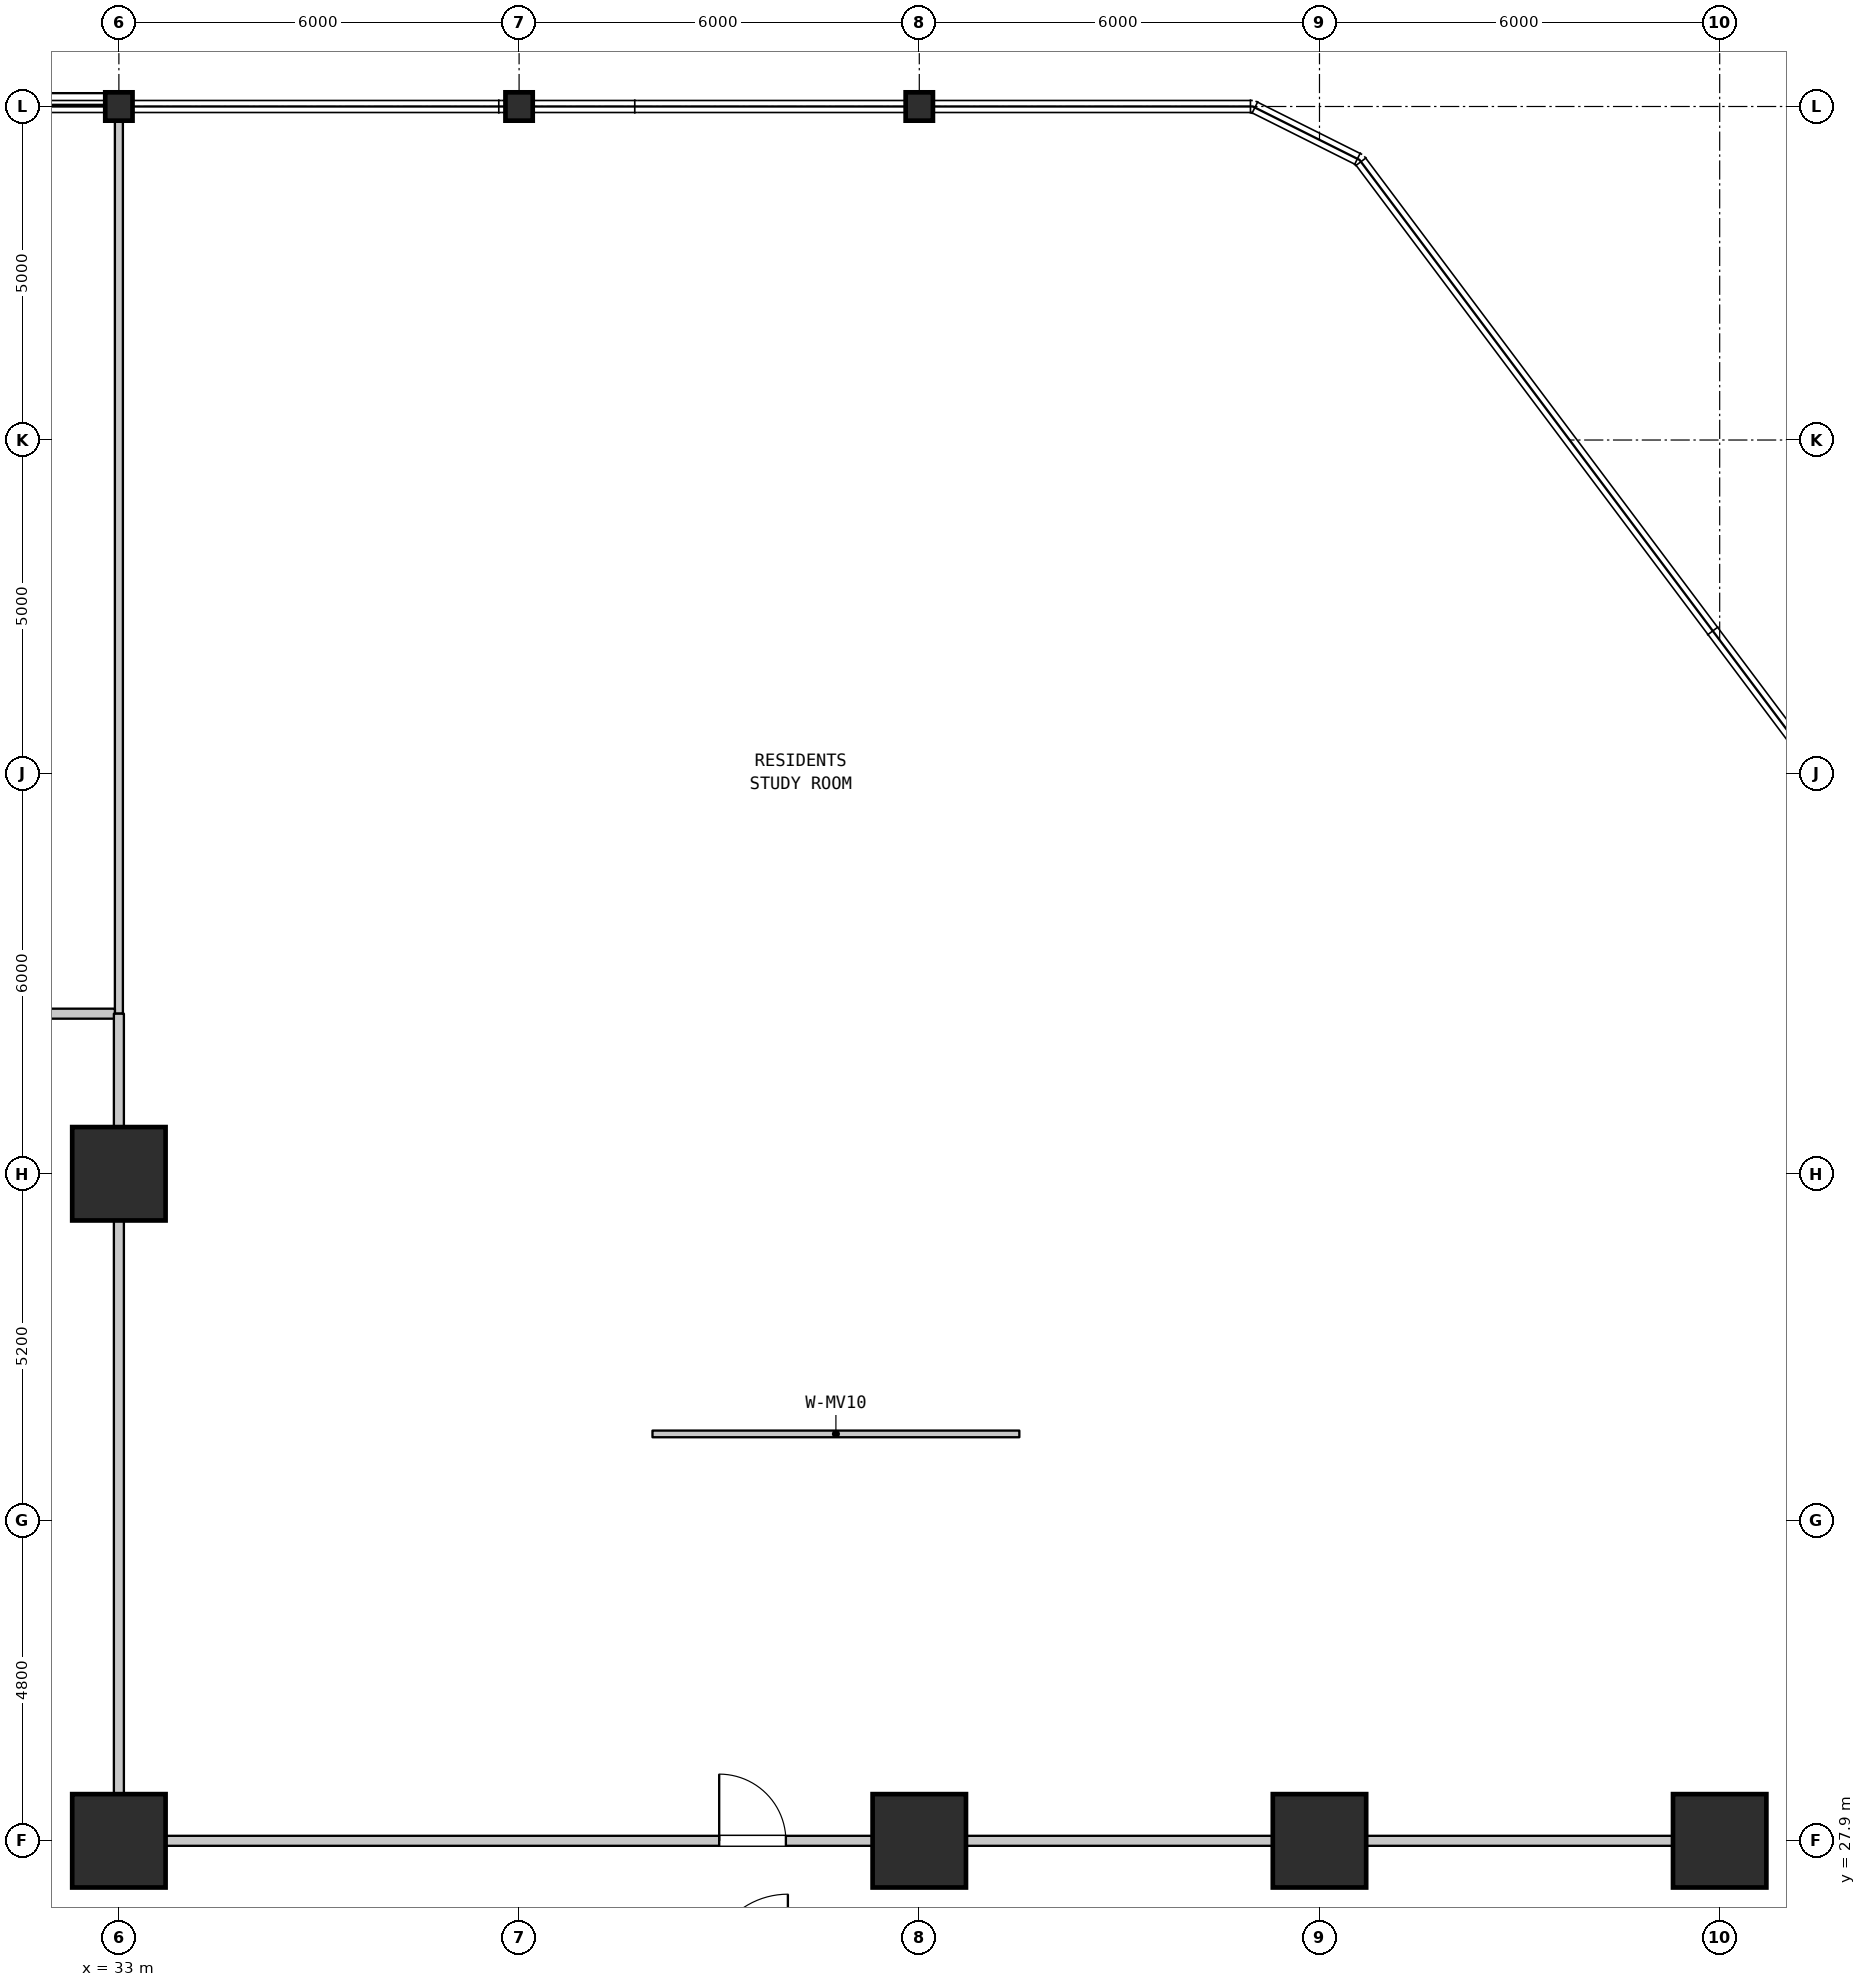
"""IFC4 building model, lengths in metres.
Left out: names, types, materials, properties, quantities, classifications, styles, units other than length and angle.
Written with IfcOpenShell. Run it as: python <this file> out.ifc"""

import sys

from ifc_helpers import new_model, si_unit, direction, frame, frame_2d, origin, origin_2d, place, context, subcontext, project, spatial, rectangle, i_section, extrude, element, fill, save


model = new_model("IFC4")
c1 = context("Model", 3, precision=1e-05, world=origin(), true_north=direction((0.0, 1.0)))
c2 = subcontext(c1, "Body", "Model", "MODEL_VIEW")
j1 = project(units=[si_unit("LENGTHUNIT", "METRE"), si_unit("PLANEANGLEUNIT", "RADIAN")], contexts=[c1])
p1 = place(None, origin())
s1 = spatial("IfcSite", under=j1, at=p1, CompositionType="ELEMENT")
p2 = place(p1, origin())
s2 = spatial("IfcBuilding", under=s1, at=p2, CompositionType="ELEMENT")
p3 = place(p2, frame((0.0, 0.0, 19.0)))
s3 = spatial("IfcBuildingStorey", under=s2, at=p3, CompositionType="ELEMENT", Elevation=19.0)
for number, where, z_axis, x_axis in (
    (1, (33.0, 27.9, 0.0), (0.0, 0.0, 1.0), (1.0, 0.0, 0.0)),
    (2, (33.0, 37.9, 0.0), (0.0, 0.0, 1.0), (1.0, 0.0, 0.0)),
):
    element("IfcColumn", number, at=place(p3, frame(where, z_axis=z_axis, x_axis=x_axis)), inside=s3, PredefinedType="COLUMN", context=c2, shape_type="SweptSolid", body=[
        extrude(rectangle(XDim=1.4, YDim=1.4, at=origin_2d()), origin(), (0.0, 0.0, 1.0), 5.0),
    ])
for number, where, z_axis, x_axis in (
    (3, (33.0, 53.9, 0.0), (0.0, 0.0, 1.0), (1.0, 0.0, 0.0)),
    (4, (39.0, 53.9, 0.0), (0.0, 0.0, 1.0), (1.0, 0.0, 0.0)),
):
    element("IfcColumn", number, at=place(p3, frame(where, z_axis=z_axis, x_axis=x_axis)), inside=s3, PredefinedType="COLUMN", context=c2, shape_type="SweptSolid", body=[
        extrude(i_section(OverallWidth=0.409, OverallDepth=0.425, WebThickness=0.032, FlangeThickness=0.052, FilletRadius=0.015, at=origin_2d()), origin(), (0.0, 0.0, 1.0), 5.0),
    ])
p4 = place(p3, frame((45.0, 27.9, 0.0), z_axis=(0.0, 0.0, 1.0), x_axis=(1.0, 0.0, 0.0)))
e5 = element("IfcColumn", 5, at=p4, inside=s3, PredefinedType="COLUMN", context=c2, shape_type="SweptSolid", body=[
    extrude(rectangle(XDim=1.4, YDim=1.4, at=origin_2d()), origin(), (0.0, 0.0, 1.0), 5.0),
])
p5 = place(p3, frame((45.0, 53.9, 0.0), z_axis=(0.0, 0.0, 1.0), x_axis=(1.0, 0.0, 0.0)))
e6 = element("IfcColumn", 6, at=p5, inside=s3, PredefinedType="COLUMN", context=c2, shape_type="SweptSolid", body=[
    extrude(i_section(OverallWidth=0.409, OverallDepth=0.425, WebThickness=0.032, FlangeThickness=0.052, FilletRadius=0.015, at=origin_2d()), origin(), (0.0, 0.0, 1.0), 5.0),
])
for number, where, z_axis, x_axis in (
    (7, (51.0, 27.9, 0.0), (0.0, 0.0, 1.0), (1.0, 0.0, 0.0)),
    (8, (57.0, 27.9, 0.0), (0.0, 0.0, 1.0), (1.0, 0.0, 0.0)),
):
    element("IfcColumn", number, at=place(p3, frame(where, z_axis=z_axis, x_axis=x_axis)), inside=s3, PredefinedType="COLUMN", context=c2, shape_type="SweptSolid", body=[
        extrude(rectangle(XDim=1.4, YDim=1.4, at=origin_2d()), origin(), (0.0, 0.0, 1.0), 5.0),
    ])
p6 = place(p3, frame((33.0, 27.9, 0.0), z_axis=(0.0, 0.0, 1.0), x_axis=(0.0, 1.0, 0.0)))
e9 = element("IfcWall", 9, at=p6, inside=s3, PredefinedType="STANDARD", context=c2, shape_type="SweptSolid", body=[
    extrude(rectangle(XDim=10.0, YDim=0.15, at=frame_2d((5.0, 0.0))), origin(), (0.0, 0.0, 1.0), 4.185),
])
p7 = place(p3, frame((33.0, 40.3, 0.0), z_axis=(0.0, 0.0, 1.0), x_axis=(0.0, 1.0, 0.0)))
e10 = element("IfcWall", 10, at=p7, inside=s3, PredefinedType="PARTITIONING", context=c2, shape_type="SweptSolid", body=[
    extrude(rectangle(XDim=13.59, YDim=0.12, at=frame_2d((6.795, 0.0))), origin(), (0.0, 0.0, 1.0), 4.085),
])
p8 = place(p3, frame((33.06, 27.9, 0.0), z_axis=(0.0, 0.0, 1.0), x_axis=(1.0, 0.0, 0.0)))
e11 = element("IfcWall", 11, at=p8, inside=s3, PredefinedType="STANDARD", context=c2, shape_type="SweptSolid", body=[
    extrude(rectangle(XDim=23.94, YDim=0.15, at=frame_2d((11.97, 0.0))), origin(), (0.0, 0.0, 1.0), 4.185),
])
p9 = place(p8, frame((8.94, 0.0, 0.0)))
e12 = element("IfcOpeningElement", 12, at=p9, cuts=e11, PredefinedType="OPENING", context=c2, shape_type="SweptSolid", body=[
    extrude(rectangle(XDim=1.0, YDim=2.15, at=frame_2d((0.5, 1.075))), frame((0.0, 0.085, 0.0), z_axis=(0.0, -1.0, 0.0), x_axis=(1.0, 0.0, 0.0)), (0.0, 0.0, 1.0), 0.17),
])
p10 = place(p3, frame((15.045, 40.3, 0.0), z_axis=(0.0, 0.0, 1.0), x_axis=(1.0, 0.0, 0.0)))
e13 = element("IfcWall", 13, at=p10, inside=s3, PredefinedType="STANDARD", context=c2, shape_type="SweptSolid", body=[
    extrude(rectangle(XDim=17.895, YDim=0.15, at=frame_2d((8.948, 0.0))), origin(), (0.0, 0.0, 1.0), 4.685),
])
p11 = place(p10, frame((8.955, 0.0, 0.0)))
e14 = element("IfcOpeningElement", 14, at=p11, cuts=e13, PredefinedType="OPENING", context=c2, shape_type="SweptSolid", body=[
    extrude(rectangle(XDim=1.0, YDim=2.15, at=frame_2d((0.5, 1.075))), frame((0.0, 0.085, 0.0), z_axis=(0.0, -1.0, 0.0), x_axis=(1.0, 0.0, 0.0)), (0.0, 0.0, 1.0), 0.17),
])
p12 = place(p3, frame((41.0, 34.0, 0.0), z_axis=(0.0, 0.0, 1.0), x_axis=(1.0, 0.0, 0.0)))
e15 = element("IfcWall", 15, at=p12, inside=s3, PredefinedType="MOVABLE", context=c2, shape_type="SweptSolid", body=[
    extrude(rectangle(XDim=5.5, YDim=0.1, at=frame_2d((2.75, 0.0))), origin(), (0.0, 0.0, 1.0), 4.635),
])
p13 = place(p3, frame((33.0, 37.9, 0.0), z_axis=(0.0, 0.0, 1.0), x_axis=(0.0, 1.0, 0.0)))
e16 = element("IfcWall", 16, at=p13, inside=s3, PredefinedType="STANDARD", context=c2, shape_type="SweptSolid", body=[
    extrude(rectangle(XDim=2.4, YDim=0.15, at=frame_2d((1.2, 0.0))), origin(), (0.0, 0.0, 1.0), 4.085),
])
p14 = place(p9, origin())
e17 = element("IfcDoor", 17, at=p14, inside=s3, OperationType="SINGLE_SWING_LEFT", PredefinedType="DOOR", context=c2, shape_type="SweptSolid", body=[
    extrude(rectangle(XDim=1.0, YDim=2.15, at=frame_2d((0.5, 1.075))), frame((0.0, 0.025, 0.0), z_axis=(0.0, -1.0, 0.0), x_axis=(1.0, 0.0, 0.0)), (0.0, 0.0, 1.0), 0.05),
])
fill(e12, e17)
save(model, sys.argv[1])
